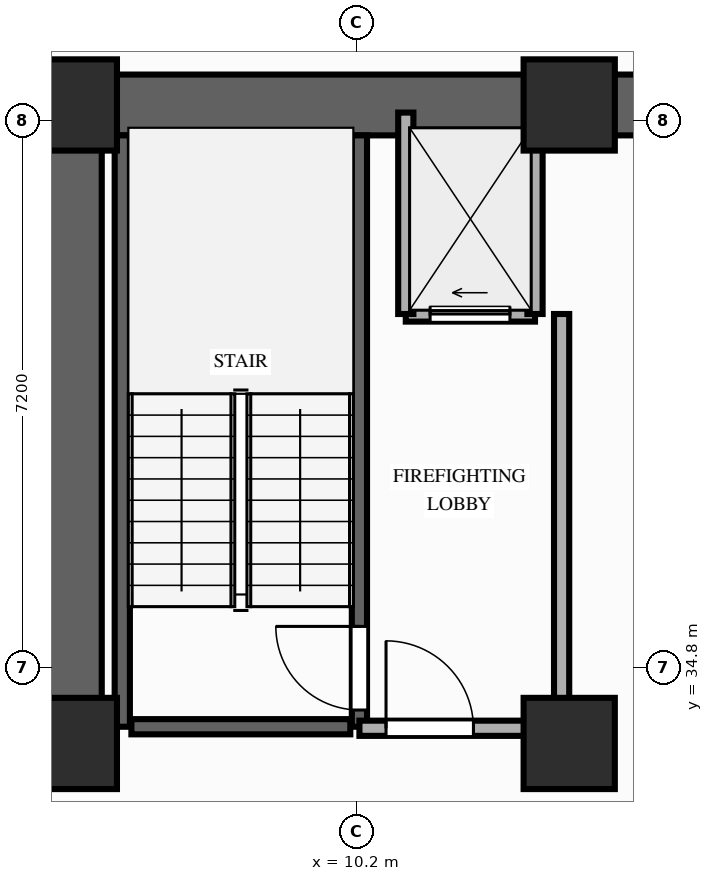
"""IFC4 building model, lengths in metres.
Left out: names, types, materials, properties, quantities, classifications, styles, units other than length and angle.
Written with IfcOpenShell. Run it as: python <this file> out.ifc"""

import sys

from ifc_helpers import new_model, si_unit, direction, frame, frame_2d, origin, origin_2d, place, context, subcontext, project, spatial, rectangle, extrude, element, fill, save


model = new_model("IFC4")
c1 = context("Model", 3, precision=1e-05, world=origin(), true_north=direction((0.0, 1.0)))
c2 = subcontext(c1, "Body", "Model", "MODEL_VIEW")
j1 = project(units=[si_unit("LENGTHUNIT", "METRE"), si_unit("PLANEANGLEUNIT", "RADIAN")], contexts=[c1])
p1 = place(None, origin())
s1 = spatial("IfcSite", under=j1, at=p1, CompositionType="ELEMENT")
p2 = place(p1, origin())
s2 = spatial("IfcBuilding", under=s1, at=p2, CompositionType="ELEMENT")
p3 = place(p2, frame((0.0, 0.0, -7.6)))
s3 = spatial("IfcBuildingStorey", under=s2, at=p3, CompositionType="ELEMENT", Elevation=-7.6)
for number, where, z_axis, x_axis in (
    (1, (6.45, 33.8, 0.0), (0.0, 0.0, 1.0), (1.0, 0.0, 0.0)),
    (2, (13.0, 33.8, 0.0), (0.0, 0.0, 1.0), (1.0, 0.0, 0.0)),
    (3, (6.45, 42.2, 0.0), (0.0, 0.0, 1.0), (1.0, 0.0, 0.0)),
    (4, (13.0, 42.2, 0.0), (0.0, 0.0, 1.0), (1.0, 0.0, 0.0)),
):
    element("IfcColumn", number, at=place(p3, frame(where, z_axis=z_axis, x_axis=x_axis)), inside=s3, PredefinedType="COLUMN", context=c2, shape_type="SweptSolid", body=[
        extrude(rectangle(XDim=1.2, YDim=1.2, at=origin_2d()), origin(), (0.0, 0.0, 1.0), 3.8),
    ])
p4 = place(p3, frame((6.45, 42.2, 0.0), z_axis=(0.0, 0.0, 1.0), x_axis=(1.0, 0.0, 0.0)))
e5 = element("IfcWall", 5, at=p4, inside=s3, PredefinedType="SHEAR", context=c2, shape_type="SweptSolid", body=[
    extrude(rectangle(XDim=20.45, YDim=0.8, at=frame_2d((10.225, 0.0))), origin(), (0.0, 0.0, 1.0), 3.55),
])
p5 = place(p3, frame((6.45, 33.8, 0.0), z_axis=(0.0, 0.0, 1.0), x_axis=(0.0, 1.0, 0.0)))
e6 = element("IfcWall", 6, at=p5, inside=s3, PredefinedType="SHEAR", context=c2, shape_type="SweptSolid", body=[
    extrude(rectangle(XDim=7.95, YDim=0.8, at=frame_2d((3.975, 0.0))), origin(), (0.0, 0.0, 1.0), 3.55),
])
p6 = place(p3, frame((7.12, 34.02, 0.0), z_axis=(0.0, 0.0, 1.0), x_axis=(0.0, 1.0, 0.0)))
e7 = element("IfcWall", 7, at=p6, inside=s3, PredefinedType="SHEAR", context=c2, shape_type="SweptSolid", body=[
    extrude(rectangle(XDim=7.78, YDim=0.2, at=frame_2d((3.89, 0.0))), origin(), (0.0, 0.0, 1.0), 3.55),
])
p7 = place(p3, frame((10.24, 34.02, 0.0), z_axis=(0.0, 0.0, 1.0), x_axis=(0.0, 1.0, 0.0)))
e8 = element("IfcWall", 8, at=p7, inside=s3, PredefinedType="SHEAR", context=c2, shape_type="SweptSolid", body=[
    extrude(rectangle(XDim=7.78, YDim=0.2, at=frame_2d((3.89, 0.0))), origin(), (0.0, 0.0, 1.0), 3.55),
])
p8 = place(p7, frame((0.22, 0.0, 0.0)))
e9 = element("IfcOpeningElement", 9, at=p8, cuts=e8, PredefinedType="OPENING", context=c2, shape_type="SweptSolid", body=[
    extrude(rectangle(XDim=1.1, YDim=2.15, at=frame_2d((0.55, 1.075))), frame((0.0, 0.11, 0.0), z_axis=(0.0, -1.0, 0.0), x_axis=(1.0, 0.0, 0.0)), (0.0, 0.0, 1.0), 0.22),
])
p9 = place(p3, frame((7.24, 34.02, 0.0), z_axis=(0.0, 0.0, 1.0), x_axis=(1.0, 0.0, 0.0)))
e10 = element("IfcWall", 10, at=p9, inside=s3, PredefinedType="SHEAR", context=c2, shape_type="SweptSolid", body=[
    extrude(rectangle(XDim=2.88, YDim=0.2, at=frame_2d((1.44, 0.0))), origin(), (0.0, 0.0, 1.0), 3.55),
])
p10 = place(p3, frame((10.85, 39.45, 0.0), z_axis=(0.0, 0.0, 1.0), x_axis=(1.0, 0.0, 0.0)))
e11 = element("IfcWall", 11, at=p10, inside=s3, PredefinedType="MOVABLE", context=c2, shape_type="SweptSolid", body=[
    extrude(rectangle(XDim=1.7, YDim=0.2, at=frame_2d((0.85, 0.0))), origin(), (0.0, 0.0, 1.0), 3.55),
])
p11 = place(p10, frame((0.32, 0.0, 0.0)))
e12 = element("IfcOpeningElement", 12, at=p11, cuts=e11, PredefinedType="OPENING", context=c2, shape_type="SweptSolid", body=[
    extrude(rectangle(XDim=1.05, YDim=2.15, at=frame_2d((0.525, 1.075))), frame((0.0, 0.11, 0.0), z_axis=(0.0, -1.0, 0.0), x_axis=(1.0, 0.0, 0.0)), (0.0, 0.0, 1.0), 0.22),
])
for number, where, z_axis, x_axis in (
    (13, (10.85, 39.45, 0.0), (0.0, 0.0, 1.0), (0.0, 1.0, 0.0)),
    (14, (12.55, 39.45, 0.0), (0.0, 0.0, 1.0), (0.0, 1.0, 0.0)),
):
    element("IfcWall", number, at=place(p3, frame(where, z_axis=z_axis, x_axis=x_axis)), inside=s3, PredefinedType="MOVABLE", context=c2, shape_type="SweptSolid", body=[
        extrude(rectangle(XDim=2.65, YDim=0.2, at=frame_2d((1.325, 0.0))), origin(), (0.0, 0.0, 1.0), 3.55),
    ])
p12 = place(p3, frame((12.9, 34.0, 0.0), z_axis=(0.0, 0.0, 1.0), x_axis=(0.0, 1.0, 0.0)))
e15 = element("IfcWall", 15, at=p12, inside=s3, PredefinedType="PARTITIONING", context=c2, shape_type="SweptSolid", body=[
    extrude(rectangle(XDim=5.45, YDim=0.2, at=frame_2d((2.725, 0.0))), origin(), (0.0, 0.0, 1.0), 2.72),
])
p13 = place(p3, frame((10.24, 34.0, 0.0), z_axis=(0.0, 0.0, 1.0), x_axis=(1.0, 0.0, 0.0)))
e16 = element("IfcWall", 16, at=p13, inside=s3, PredefinedType="PARTITIONING", context=c2, shape_type="SweptSolid", body=[
    extrude(rectangle(XDim=2.66, YDim=0.2, at=frame_2d((1.33, 0.0))), origin(), (0.0, 0.0, 1.0), 2.72),
])
p14 = place(p13, frame((0.35, 0.0, 0.0)))
e17 = element("IfcOpeningElement", 17, at=p14, cuts=e16, PredefinedType="OPENING", context=c2, shape_type="SweptSolid", body=[
    extrude(rectangle(XDim=1.15, YDim=2.15, at=frame_2d((0.575, 1.075))), frame((0.0, 0.11, 0.0), z_axis=(0.0, -1.0, 0.0), x_axis=(1.0, 0.0, 0.0)), (0.0, 0.0, 1.0), 0.22),
])
p15 = place(p8, origin())
e18 = element("IfcDoor", 18, at=p15, inside=s3, OperationType="SINGLE_SWING_RIGHT", PredefinedType="DOOR", context=c2, shape_type="SweptSolid", body=[
    extrude(rectangle(XDim=1.1, YDim=2.15, at=frame_2d((0.55, 1.075))), frame((0.0, 0.025, 0.0), z_axis=(0.0, -1.0, 0.0), x_axis=(1.0, 0.0, 0.0)), (0.0, 0.0, 1.0), 0.05),
])
fill(e9, e18)
p16 = place(p11, origin())
e19 = element("IfcDoor", 19, at=p16, inside=s3, OperationType="SLIDING_TO_LEFT", PredefinedType="DOOR", context=c2, shape_type="SweptSolid", body=[
    extrude(rectangle(XDim=1.05, YDim=2.15, at=frame_2d((0.525, 1.075))), frame((0.0, 0.025, 0.0), z_axis=(0.0, -1.0, 0.0), x_axis=(1.0, 0.0, 0.0)), (0.0, 0.0, 1.0), 0.05),
])
fill(e12, e19)
p17 = place(p14, origin())
e20 = element("IfcDoor", 20, at=p17, inside=s3, OperationType="SINGLE_SWING_LEFT", PredefinedType="DOOR", context=c2, shape_type="SweptSolid", body=[
    extrude(rectangle(XDim=1.15, YDim=2.15, at=frame_2d((0.575, 1.075))), frame((0.0, 0.025, 0.0), z_axis=(0.0, -1.0, 0.0), x_axis=(1.0, 0.0, 0.0)), (0.0, 0.0, 1.0), 0.05),
])
fill(e17, e20)
save(model, sys.argv[1])
